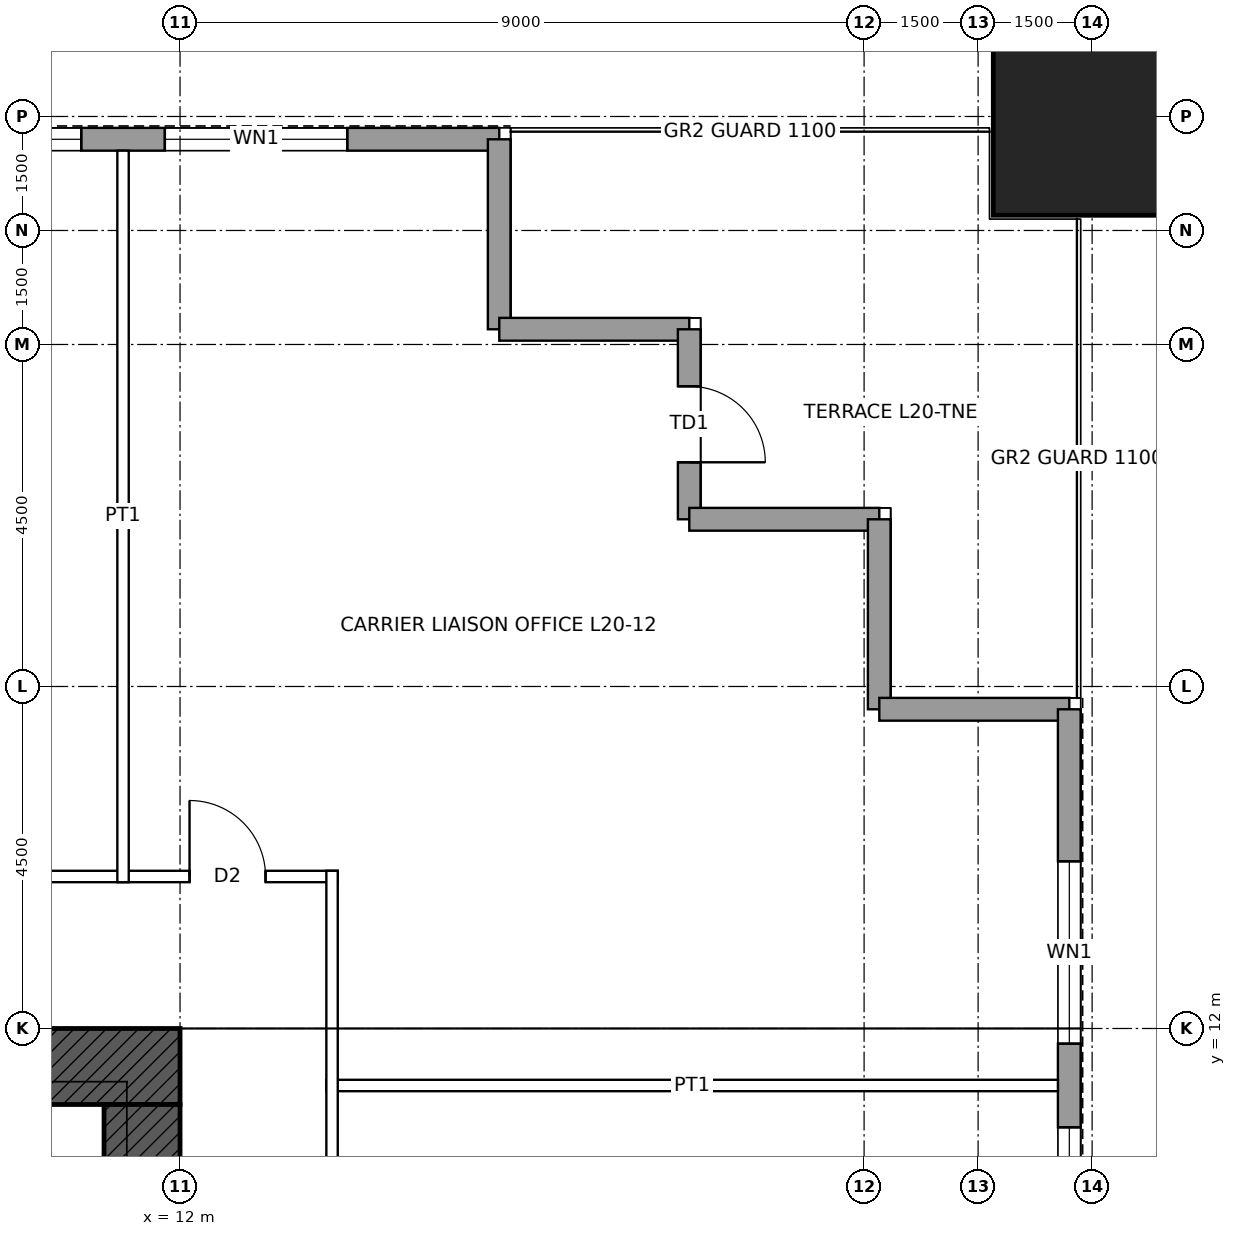
"""IFC4 building model, lengths in metres.
Left out: names, types, materials, properties, quantities, classifications, styles, units other than length and angle.
Written with IfcOpenShell. Run it as: python <this file> out.ifc"""

import sys

from ifc_helpers import new_model, si_unit, direction, frame, frame_2d, origin, origin_2d, place, context, subcontext, project, spatial, rectangle, hollow_rectangle, extrude, element, fill, save


model = new_model("IFC4")
c1 = context("Model", 3, precision=1e-05, world=origin(), true_north=direction((0.0, 1.0)))
c2 = subcontext(c1, "Body", "Model", "MODEL_VIEW")
j1 = project(units=[si_unit("LENGTHUNIT", "METRE"), si_unit("PLANEANGLEUNIT", "RADIAN")], contexts=[c1])
p1 = place(None, origin())
s1 = spatial("IfcSite", under=j1, at=p1, CompositionType="ELEMENT")
p2 = place(p1, origin())
s2 = spatial("IfcBuilding", under=s1, at=p2, CompositionType="ELEMENT")
p3 = place(p2, frame((0.0, 0.0, 104.4)))
s3 = spatial("IfcBuildingStorey", under=s2, at=p3, CompositionType="ELEMENT", Elevation=104.4)
p4 = place(p3, frame((24.0, 24.0, 0.0), z_axis=(0.0, 0.0, 1.0), x_axis=(1.0, 0.0, 0.0)))
e1 = element("IfcColumn", 1, at=p4, inside=s3, PredefinedType="COLUMN", context=c2, shape_type="SweptSolid", body=[
    extrude(hollow_rectangle(XDim=2.6, YDim=2.6, WallThickness=0.13, at=origin_2d()), origin(), (0.0, 0.0, 1.0), 4.5),
])
p5 = place(p3, frame((-12.0, 11.5, 0.0), z_axis=(0.0, 0.0, 1.0), x_axis=(1.0, 0.0, 0.0)))
e2 = element("IfcWall", 2, at=p5, inside=s3, PredefinedType="SHEAR", context=c2, shape_type="SweptSolid", body=[
    extrude(rectangle(XDim=24.0, YDim=1.0, at=frame_2d((12.0, 0.0))), origin(), (0.0, 0.0, 1.0), 4.5),
])
p6 = place(p5, frame((6.25, 0.0, 0.0)))
e3 = element("IfcOpeningElement", 3, at=p6, cuts=e2, PredefinedType="OPENING", context=c2, shape_type="SweptSolid", body=[
    extrude(rectangle(XDim=1.0, YDim=2.4, at=frame_2d((0.5, 1.2))), frame((0.0, 0.51, 0.0), z_axis=(0.0, -1.0, 0.0), x_axis=(1.0, 0.0, 0.0)), (0.0, 0.0, 1.0), 1.02),
])
p7 = place(p5, frame((16.75, 0.0, 0.0)))
e4 = element("IfcOpeningElement", 4, at=p7, cuts=e2, PredefinedType="OPENING", context=c2, shape_type="SweptSolid", body=[
    extrude(rectangle(XDim=1.0, YDim=2.4, at=frame_2d((0.5, 1.2))), frame((0.0, 0.51, 0.0), z_axis=(0.0, -1.0, 0.0), x_axis=(1.0, 0.0, 0.0)), (0.0, 0.0, 1.0), 1.02),
])
p8 = place(p3, frame((11.5, 11.0, 0.0), z_axis=(0.0, 0.0, 1.0), x_axis=(0.0, -1.0, 0.0)))
e5 = element("IfcWall", 5, at=p8, inside=s3, PredefinedType="SHEAR", context=c2, shape_type="SweptSolid", body=[
    extrude(rectangle(XDim=22.0, YDim=1.0, at=frame_2d((11.0, 0.0))), origin(), (0.0, 0.0, 1.0), 4.5),
])
p9 = place(p8, frame((10.5, 0.0, 0.0)))
e6 = element("IfcOpeningElement", 6, at=p9, cuts=e5, PredefinedType="OPENING", context=c2, shape_type="SweptSolid", body=[
    extrude(rectangle(XDim=1.0, YDim=2.4, at=frame_2d((0.5, 1.2))), frame((0.0, 0.51, 0.0), z_axis=(0.0, -1.0, 0.0), x_axis=(1.0, 0.0, 0.0)), (0.0, 0.0, 1.0), 1.02),
])
p10 = place(p3, frame((-16.2, 23.7, 0.0), z_axis=(0.0, 0.0, 1.0), x_axis=(1.0, 0.0, 0.0)))
e7 = element("IfcWall", 7, at=p10, inside=s3, PredefinedType="SOLIDWALL", context=c2, shape_type="SweptSolid", body=[
    extrude(rectangle(XDim=32.4, YDim=0.3, at=frame_2d((16.2, 0.0))), origin(), (0.0, 0.0, 1.0), 4.3),
])
p11 = place(p10, frame((2.0, 0.0, 1.0)))
e8 = element("IfcOpeningElement", 8, at=p11, cuts=e7, PredefinedType="OPENING", context=c2, shape_type="SweptSolid", body=[
    extrude(rectangle(XDim=2.4, YDim=1.2, at=frame_2d((1.2, 0.6))), frame((0.0, 0.16, 0.0), z_axis=(0.0, -1.0, 0.0), x_axis=(1.0, 0.0, 0.0)), (0.0, 0.0, 1.0), 0.32),
])
p12 = place(p10, frame((5.5, 0.0, 1.0)))
e9 = element("IfcOpeningElement", 9, at=p12, cuts=e7, PredefinedType="OPENING", context=c2, shape_type="SweptSolid", body=[
    extrude(rectangle(XDim=2.4, YDim=1.2, at=frame_2d((1.2, 0.6))), frame((0.0, 0.16, 0.0), z_axis=(0.0, -1.0, 0.0), x_axis=(1.0, 0.0, 0.0)), (0.0, 0.0, 1.0), 0.32),
])
p13 = place(p10, frame((9.5, 0.0, 1.0)))
e10 = element("IfcOpeningElement", 10, at=p13, cuts=e7, PredefinedType="OPENING", context=c2, shape_type="SweptSolid", body=[
    extrude(rectangle(XDim=2.4, YDim=1.2, at=frame_2d((1.2, 0.6))), frame((0.0, 0.16, 0.0), z_axis=(0.0, -1.0, 0.0), x_axis=(1.0, 0.0, 0.0)), (0.0, 0.0, 1.0), 0.32),
])
p14 = place(p10, frame((13.0, 0.0, 1.0)))
e11 = element("IfcOpeningElement", 11, at=p14, cuts=e7, PredefinedType="OPENING", context=c2, shape_type="SweptSolid", body=[
    extrude(rectangle(XDim=2.4, YDim=1.2, at=frame_2d((1.2, 0.6))), frame((0.0, 0.16, 0.0), z_axis=(0.0, -1.0, 0.0), x_axis=(1.0, 0.0, 0.0)), (0.0, 0.0, 1.0), 0.32),
])
p15 = place(p10, frame((17.0, 0.0, 1.0)))
e12 = element("IfcOpeningElement", 12, at=p15, cuts=e7, PredefinedType="OPENING", context=c2, shape_type="SweptSolid", body=[
    extrude(rectangle(XDim=2.4, YDim=1.2, at=frame_2d((1.2, 0.6))), frame((0.0, 0.16, 0.0), z_axis=(0.0, -1.0, 0.0), x_axis=(1.0, 0.0, 0.0)), (0.0, 0.0, 1.0), 0.32),
])
p16 = place(p10, frame((20.5, 0.0, 1.0)))
e13 = element("IfcOpeningElement", 13, at=p16, cuts=e7, PredefinedType="OPENING", context=c2, shape_type="SweptSolid", body=[
    extrude(rectangle(XDim=2.4, YDim=1.2, at=frame_2d((1.2, 0.6))), frame((0.0, 0.16, 0.0), z_axis=(0.0, -1.0, 0.0), x_axis=(1.0, 0.0, 0.0)), (0.0, 0.0, 1.0), 0.32),
])
p17 = place(p10, frame((24.5, 0.0, 1.0)))
e14 = element("IfcOpeningElement", 14, at=p17, cuts=e7, PredefinedType="OPENING", context=c2, shape_type="SweptSolid", body=[
    extrude(rectangle(XDim=2.4, YDim=1.2, at=frame_2d((1.2, 0.6))), frame((0.0, 0.16, 0.0), z_axis=(0.0, -1.0, 0.0), x_axis=(1.0, 0.0, 0.0)), (0.0, 0.0, 1.0), 0.32),
])
p18 = place(p10, frame((28.0, 0.0, 1.0)))
e15 = element("IfcOpeningElement", 15, at=p18, cuts=e7, PredefinedType="OPENING", context=c2, shape_type="SweptSolid", body=[
    extrude(rectangle(XDim=2.4, YDim=1.2, at=frame_2d((1.2, 0.6))), frame((0.0, 0.16, 0.0), z_axis=(0.0, -1.0, 0.0), x_axis=(1.0, 0.0, 0.0)), (0.0, 0.0, 1.0), 0.32),
])
for number, where, z_axis, x_axis in (
    (16, (16.2, 23.7, 0.0), (0.0, 0.0, 1.0), (0.0, -1.0, 0.0)),
    (17, (16.2, 21.2, 0.0), (0.0, 0.0, 1.0), (1.0, 0.0, 0.0)),
):
    element("IfcWall", number, at=place(p3, frame(where, z_axis=z_axis, x_axis=x_axis)), inside=s3, PredefinedType="SOLIDWALL", context=c2, shape_type="SweptSolid", body=[
        extrude(rectangle(XDim=2.5, YDim=0.3, at=frame_2d((1.25, 0.0))), origin(), (0.0, 0.0, 1.0), 4.3),
    ])
p19 = place(p3, frame((18.7, 21.2, 0.0), z_axis=(0.0, 0.0, 1.0), x_axis=(0.0, -1.0, 0.0)))
e18 = element("IfcWall", 18, at=p19, inside=s3, PredefinedType="SOLIDWALL", context=c2, shape_type="SweptSolid", body=[
    extrude(rectangle(XDim=2.5, YDim=0.3, at=frame_2d((1.25, 0.0))), origin(), (0.0, 0.0, 1.0), 4.3),
])
p20 = place(p19, frame((0.75, 0.0, 0.0)))
e19 = element("IfcOpeningElement", 19, at=p20, cuts=e18, PredefinedType="OPENING", context=c2, shape_type="SweptSolid", body=[
    extrude(rectangle(XDim=1.0, YDim=2.4, at=frame_2d((0.5, 1.2))), frame((0.0, 0.16, 0.0), z_axis=(0.0, -1.0, 0.0), x_axis=(1.0, 0.0, 0.0)), (0.0, 0.0, 1.0), 0.32),
])
for number, where, z_axis, x_axis in (
    (20, (18.7, 18.7, 0.0), (0.0, 0.0, 1.0), (1.0, 0.0, 0.0)),
    (21, (21.2, 18.7, 0.0), (0.0, 0.0, 1.0), (0.0, -1.0, 0.0)),
    (22, (21.2, 16.2, 0.0), (0.0, 0.0, 1.0), (1.0, 0.0, 0.0)),
):
    element("IfcWall", number, at=place(p3, frame(where, z_axis=z_axis, x_axis=x_axis)), inside=s3, PredefinedType="SOLIDWALL", context=c2, shape_type="SweptSolid", body=[
        extrude(rectangle(XDim=2.5, YDim=0.3, at=frame_2d((1.25, 0.0))), origin(), (0.0, 0.0, 1.0), 4.3),
    ])
p21 = place(p3, frame((23.7, 16.2, 0.0), z_axis=(0.0, 0.0, 1.0), x_axis=(0.0, -1.0, 0.0)))
e23 = element("IfcWall", 23, at=p21, inside=s3, PredefinedType="SOLIDWALL", context=c2, shape_type="SweptSolid", body=[
    extrude(rectangle(XDim=32.4, YDim=0.3, at=frame_2d((16.2, 0.0))), origin(), (0.0, 0.0, 1.0), 4.3),
])
p22 = place(p21, frame((2.0, 0.0, 1.0)))
e24 = element("IfcOpeningElement", 24, at=p22, cuts=e23, PredefinedType="OPENING", context=c2, shape_type="SweptSolid", body=[
    extrude(rectangle(XDim=2.4, YDim=1.2, at=frame_2d((1.2, 0.6))), frame((0.0, 0.16, 0.0), z_axis=(0.0, -1.0, 0.0), x_axis=(1.0, 0.0, 0.0)), (0.0, 0.0, 1.0), 0.32),
])
p23 = place(p21, frame((5.5, 0.0, 1.0)))
e25 = element("IfcOpeningElement", 25, at=p23, cuts=e23, PredefinedType="OPENING", context=c2, shape_type="SweptSolid", body=[
    extrude(rectangle(XDim=2.4, YDim=1.2, at=frame_2d((1.2, 0.6))), frame((0.0, 0.16, 0.0), z_axis=(0.0, -1.0, 0.0), x_axis=(1.0, 0.0, 0.0)), (0.0, 0.0, 1.0), 0.32),
])
p24 = place(p21, frame((9.5, 0.0, 1.0)))
e26 = element("IfcOpeningElement", 26, at=p24, cuts=e23, PredefinedType="OPENING", context=c2, shape_type="SweptSolid", body=[
    extrude(rectangle(XDim=2.4, YDim=1.2, at=frame_2d((1.2, 0.6))), frame((0.0, 0.16, 0.0), z_axis=(0.0, -1.0, 0.0), x_axis=(1.0, 0.0, 0.0)), (0.0, 0.0, 1.0), 0.32),
])
p25 = place(p21, frame((13.0, 0.0, 1.0)))
e27 = element("IfcOpeningElement", 27, at=p25, cuts=e23, PredefinedType="OPENING", context=c2, shape_type="SweptSolid", body=[
    extrude(rectangle(XDim=2.4, YDim=1.2, at=frame_2d((1.2, 0.6))), frame((0.0, 0.16, 0.0), z_axis=(0.0, -1.0, 0.0), x_axis=(1.0, 0.0, 0.0)), (0.0, 0.0, 1.0), 0.32),
])
p26 = place(p21, frame((17.0, 0.0, 1.0)))
e28 = element("IfcOpeningElement", 28, at=p26, cuts=e23, PredefinedType="OPENING", context=c2, shape_type="SweptSolid", body=[
    extrude(rectangle(XDim=2.4, YDim=1.2, at=frame_2d((1.2, 0.6))), frame((0.0, 0.16, 0.0), z_axis=(0.0, -1.0, 0.0), x_axis=(1.0, 0.0, 0.0)), (0.0, 0.0, 1.0), 0.32),
])
p27 = place(p21, frame((20.5, 0.0, 1.0)))
e29 = element("IfcOpeningElement", 29, at=p27, cuts=e23, PredefinedType="OPENING", context=c2, shape_type="SweptSolid", body=[
    extrude(rectangle(XDim=2.4, YDim=1.2, at=frame_2d((1.2, 0.6))), frame((0.0, 0.16, 0.0), z_axis=(0.0, -1.0, 0.0), x_axis=(1.0, 0.0, 0.0)), (0.0, 0.0, 1.0), 0.32),
])
p28 = place(p21, frame((24.5, 0.0, 1.0)))
e30 = element("IfcOpeningElement", 30, at=p28, cuts=e23, PredefinedType="OPENING", context=c2, shape_type="SweptSolid", body=[
    extrude(rectangle(XDim=2.4, YDim=1.2, at=frame_2d((1.2, 0.6))), frame((0.0, 0.16, 0.0), z_axis=(0.0, -1.0, 0.0), x_axis=(1.0, 0.0, 0.0)), (0.0, 0.0, 1.0), 0.32),
])
p29 = place(p21, frame((28.0, 0.0, 1.0)))
e31 = element("IfcOpeningElement", 31, at=p29, cuts=e23, PredefinedType="OPENING", context=c2, shape_type="SweptSolid", body=[
    extrude(rectangle(XDim=2.4, YDim=1.2, at=frame_2d((1.2, 0.6))), frame((0.0, 0.16, 0.0), z_axis=(0.0, -1.0, 0.0), x_axis=(1.0, 0.0, 0.0)), (0.0, 0.0, 1.0), 0.32),
])
p30 = place(p3, frame((13.925, 11.25, 0.0), z_axis=(0.0, 0.0, 1.0), x_axis=(1.0, 0.0, 0.0)))
e32 = element("IfcWall", 32, at=p30, inside=s3, PredefinedType="PARTITIONING", context=c2, shape_type="SweptSolid", body=[
    extrude(rectangle(XDim=9.625, YDim=0.15, at=frame_2d((4.812, 0.0))), origin(), (0.0, 0.0, 1.0), 3.431),
])
p31 = place(p3, frame((-14.075, 14.0, 0.0), z_axis=(0.0, 0.0, 1.0), x_axis=(1.0, 0.0, 0.0)))
e33 = element("IfcWall", 33, at=p31, inside=s3, PredefinedType="PARTITIONING", context=c2, shape_type="SweptSolid", body=[
    extrude(rectangle(XDim=28.15, YDim=0.15, at=frame_2d((14.075, 0.0))), origin(), (0.0, 0.0, 1.0), 4.3),
])
p32 = place(p31, frame((9.425, 0.0, 0.0)))
e34 = element("IfcOpeningElement", 34, at=p32, cuts=e33, PredefinedType="OPENING", context=c2, shape_type="SweptSolid", body=[
    extrude(rectangle(XDim=1.8, YDim=2.4, at=frame_2d((0.9, 1.2))), frame((0.0, 0.085, 0.0), z_axis=(0.0, -1.0, 0.0), x_axis=(1.0, 0.0, 0.0)), (0.0, 0.0, 1.0), 0.17),
])
p33 = place(p31, frame((20.675, 0.0, 0.0)))
e35 = element("IfcOpeningElement", 35, at=p33, cuts=e33, PredefinedType="OPENING", context=c2, shape_type="SweptSolid", body=[
    extrude(rectangle(XDim=1.8, YDim=2.4, at=frame_2d((0.9, 1.2))), frame((0.0, 0.085, 0.0), z_axis=(0.0, -1.0, 0.0), x_axis=(1.0, 0.0, 0.0)), (0.0, 0.0, 1.0), 0.17),
])
p34 = place(p31, frame((26.2, 0.0, 0.0)))
e36 = element("IfcOpeningElement", 36, at=p34, cuts=e33, PredefinedType="OPENING", context=c2, shape_type="SweptSolid", body=[
    extrude(rectangle(XDim=1.0, YDim=2.1, at=frame_2d((0.5, 1.05))), frame((0.0, 0.085, 0.0), z_axis=(0.0, -1.0, 0.0), x_axis=(1.0, 0.0, 0.0)), (0.0, 0.0, 1.0), 0.17),
])
p35 = place(p31, frame((0.95, 0.0, 0.0)))
e37 = element("IfcOpeningElement", 37, at=p35, cuts=e33, PredefinedType="OPENING", context=c2, shape_type="SweptSolid", body=[
    extrude(rectangle(XDim=1.0, YDim=2.1, at=frame_2d((0.5, 1.05))), frame((0.0, 0.085, 0.0), z_axis=(0.0, -1.0, 0.0), x_axis=(1.0, 0.0, 0.0)), (0.0, 0.0, 1.0), 0.17),
])
p36 = place(p3, frame((11.25, 13.925, 0.0), z_axis=(0.0, 0.0, 1.0), x_axis=(0.0, 1.0, 0.0)))
e38 = element("IfcWall", 38, at=p36, inside=s3, PredefinedType="PARTITIONING", context=c2, shape_type="SweptSolid", body=[
    extrude(rectangle(XDim=9.625, YDim=0.15, at=frame_2d((4.812, 0.0))), origin(), (0.0, 0.0, 1.0), 3.431),
])
p37 = place(p3, frame((14.0, -14.075, 0.0), z_axis=(0.0, 0.0, 1.0), x_axis=(0.0, 1.0, 0.0)))
e39 = element("IfcWall", 39, at=p37, inside=s3, PredefinedType="PARTITIONING", context=c2, shape_type="SweptSolid", body=[
    extrude(rectangle(XDim=28.15, YDim=0.15, at=frame_2d((14.075, 0.0))), origin(), (0.0, 0.0, 1.0), 4.3),
])
p38 = place(p37, frame((20.675, 0.0, 0.0)))
e40 = element("IfcOpeningElement", 40, at=p38, cuts=e39, PredefinedType="OPENING", context=c2, shape_type="SweptSolid", body=[
    extrude(rectangle(XDim=1.8, YDim=2.4, at=frame_2d((0.9, 1.2))), frame((0.0, 0.085, 0.0), z_axis=(0.0, -1.0, 0.0), x_axis=(1.0, 0.0, 0.0)), (0.0, 0.0, 1.0), 0.17),
])
p39 = place(p37, frame((13.175, 0.0, 0.0)))
e41 = element("IfcOpeningElement", 41, at=p39, cuts=e39, PredefinedType="OPENING", context=c2, shape_type="SweptSolid", body=[
    extrude(rectangle(XDim=1.8, YDim=2.4, at=frame_2d((0.9, 1.2))), frame((0.0, 0.085, 0.0), z_axis=(0.0, -1.0, 0.0), x_axis=(1.0, 0.0, 0.0)), (0.0, 0.0, 1.0), 0.17),
])
p40 = place(p37, frame((5.675, 0.0, 0.0)))
e42 = element("IfcOpeningElement", 42, at=p40, cuts=e39, PredefinedType="OPENING", context=c2, shape_type="SweptSolid", body=[
    extrude(rectangle(XDim=1.8, YDim=2.4, at=frame_2d((0.9, 1.2))), frame((0.0, 0.085, 0.0), z_axis=(0.0, -1.0, 0.0), x_axis=(1.0, 0.0, 0.0)), (0.0, 0.0, 1.0), 0.17),
])
p41 = place(p17, origin())
e43 = element("IfcWindow", 43, at=p41, inside=s3, PartitioningType="SINGLE_PANEL", PredefinedType="WINDOW", context=c2, shape_type="SweptSolid", body=[
    extrude(rectangle(XDim=2.4, YDim=1.2, at=frame_2d((1.2, 0.6))), frame((0.0, 0.03, 0.0), z_axis=(0.0, -1.0, 0.0), x_axis=(1.0, 0.0, 0.0)), (0.0, 0.0, 1.0), 0.06),
])
fill(e14, e43)
p42 = place(p18, origin())
e44 = element("IfcWindow", 44, at=p42, inside=s3, PartitioningType="SINGLE_PANEL", PredefinedType="WINDOW", context=c2, shape_type="SweptSolid", body=[
    extrude(rectangle(XDim=2.4, YDim=1.2, at=frame_2d((1.2, 0.6))), frame((0.0, 0.03, 0.0), z_axis=(0.0, -1.0, 0.0), x_axis=(1.0, 0.0, 0.0)), (0.0, 0.0, 1.0), 0.06),
])
fill(e15, e44)
p43 = place(p20, origin())
e45 = element("IfcDoor", 45, at=p43, inside=s3, OperationType="SINGLE_SWING_RIGHT", PredefinedType="DOOR", context=c2, shape_type="SweptSolid", body=[
    extrude(rectangle(XDim=1.0, YDim=2.4, at=frame_2d((0.5, 1.2))), frame((0.0, 0.025, 0.0), z_axis=(0.0, -1.0, 0.0), x_axis=(1.0, 0.0, 0.0)), (0.0, 0.0, 1.0), 0.05),
])
fill(e19, e45)
p44 = place(p22, origin())
e46 = element("IfcWindow", 46, at=p44, inside=s3, PartitioningType="SINGLE_PANEL", PredefinedType="WINDOW", context=c2, shape_type="SweptSolid", body=[
    extrude(rectangle(XDim=2.4, YDim=1.2, at=frame_2d((1.2, 0.6))), frame((0.0, 0.03, 0.0), z_axis=(0.0, -1.0, 0.0), x_axis=(1.0, 0.0, 0.0)), (0.0, 0.0, 1.0), 0.06),
])
fill(e24, e46)
p45 = place(p23, origin())
e47 = element("IfcWindow", 47, at=p45, inside=s3, PartitioningType="SINGLE_PANEL", PredefinedType="WINDOW", context=c2, shape_type="SweptSolid", body=[
    extrude(rectangle(XDim=2.4, YDim=1.2, at=frame_2d((1.2, 0.6))), frame((0.0, 0.03, 0.0), z_axis=(0.0, -1.0, 0.0), x_axis=(1.0, 0.0, 0.0)), (0.0, 0.0, 1.0), 0.06),
])
fill(e25, e47)
p46 = place(p34, origin())
e48 = element("IfcDoor", 48, at=p46, inside=s3, OperationType="SINGLE_SWING_LEFT", PredefinedType="DOOR", context=c2, shape_type="SweptSolid", body=[
    extrude(rectangle(XDim=1.0, YDim=2.1, at=frame_2d((0.5, 1.05))), frame((0.0, 0.025, 0.0), z_axis=(0.0, -1.0, 0.0), x_axis=(1.0, 0.0, 0.0)), (0.0, 0.0, 1.0), 0.05),
])
fill(e36, e48)
save(model, sys.argv[1])
